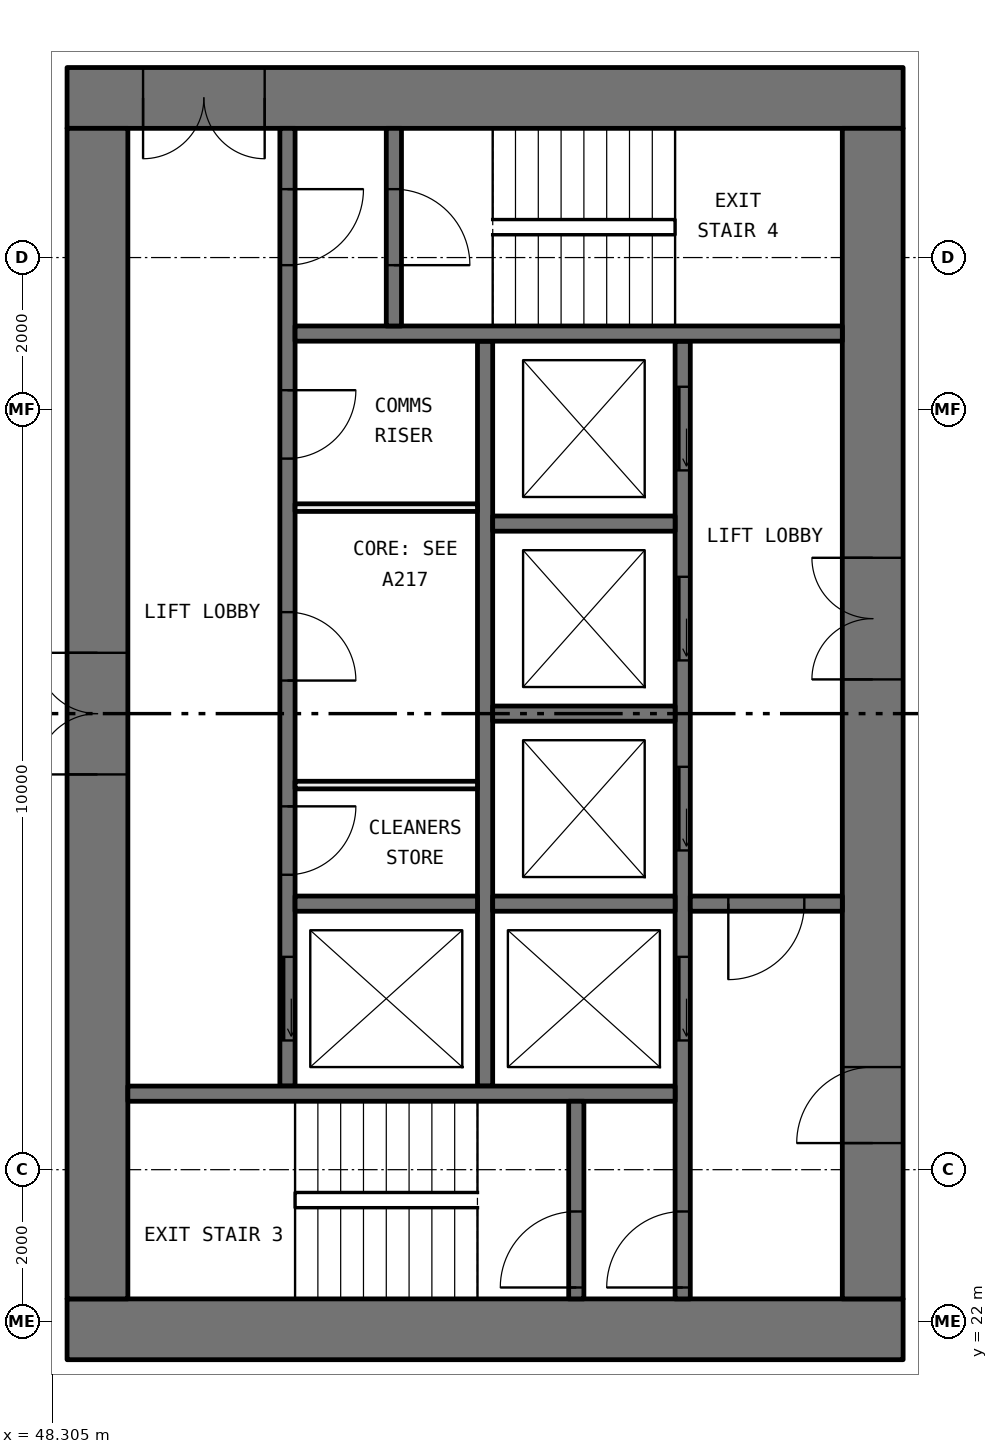
"""IFC4 building model, lengths in metres.
Left out: names, types, materials, properties, quantities, classifications, styles, units other than length and angle.
Written with IfcOpenShell. Run it as: python <this file> out.ifc"""

import sys

from ifc_helpers import new_model, si_unit, direction, frame, frame_2d, origin, place, context, subcontext, project, spatial, rectangle, extrude, element, fill, save


model = new_model("IFC4")
c1 = context("Model", 3, precision=1e-05, world=origin(), true_north=direction((0.0, 1.0)))
c2 = subcontext(c1, "Body", "Model", "MODEL_VIEW")
j1 = project(units=[si_unit("LENGTHUNIT", "METRE"), si_unit("PLANEANGLEUNIT", "RADIAN")], contexts=[c1])
p1 = place(None, origin())
s1 = spatial("IfcSite", under=j1, at=p1, CompositionType="ELEMENT")
p2 = place(p1, origin())
s2 = spatial("IfcBuilding", under=s1, at=p2, CompositionType="ELEMENT")
p3 = place(p2, frame((0.0, 0.0, 67.95)))
s3 = spatial("IfcBuildingStorey", under=s2, at=p3, CompositionType="ELEMENT", Elevation=67.95)
p4 = place(p3, frame((59.5, 21.9, 0.0), z_axis=(0.0, 0.0, 1.0), x_axis=(-1.0, 0.0, 0.0)))
e1 = element("IfcWall", 1, at=p4, inside=s3, PredefinedType="SHEAR", context=c2, shape_type="SweptSolid", body=[
    extrude(rectangle(XDim=11.0, YDim=0.8, at=frame_2d((5.5, 0.0))), origin(), (0.0, 0.0, 1.0), 3.05),
])
p5 = place(p3, frame((59.5, 38.1, 0.0), z_axis=(0.0, 0.0, 1.0), x_axis=(-1.0, 0.0, 0.0)))
e2 = element("IfcWall", 2, at=p5, inside=s3, PredefinedType="SHEAR", context=c2, shape_type="SweptSolid", body=[
    extrude(rectangle(XDim=11.0, YDim=0.8, at=frame_2d((5.5, 0.0))), origin(), (0.0, 0.0, 1.0), 3.05),
])
p6 = place(p5, frame((8.4, 0.0, 0.0)))
e3 = element("IfcOpeningElement", 3, at=p6, cuts=e2, PredefinedType="OPENING", context=c2, shape_type="SweptSolid", body=[
    extrude(rectangle(XDim=1.6, YDim=2.1, at=frame_2d((0.8, 1.05))), frame((0.0, 0.41, 0.0), z_axis=(0.0, -1.0, 0.0), x_axis=(1.0, 0.0, 0.0)), (0.0, 0.0, 1.0), 0.82),
])
p7 = place(p3, frame((59.1, 22.3, 0.0), z_axis=(0.0, 0.0, 1.0), x_axis=(0.0, 1.0, 0.0)))
e4 = element("IfcWall", 4, at=p7, inside=s3, PredefinedType="SHEAR", context=c2, shape_type="SweptSolid", body=[
    extrude(rectangle(XDim=15.4, YDim=0.8, at=frame_2d((7.7, 0.0))), origin(), (0.0, 0.0, 1.0), 3.05),
])
p8 = place(p7, frame((8.15, 0.0, 0.0)))
e5 = element("IfcOpeningElement", 5, at=p8, cuts=e4, PredefinedType="OPENING", context=c2, shape_type="SweptSolid", body=[
    extrude(rectangle(XDim=1.6, YDim=2.1, at=frame_2d((0.8, 1.05))), frame((0.0, 0.41, 0.0), z_axis=(0.0, -1.0, 0.0), x_axis=(1.0, 0.0, 0.0)), (0.0, 0.0, 1.0), 0.82),
])
p9 = place(p7, frame((2.05, 0.0, 0.0)))
e6 = element("IfcOpeningElement", 6, at=p9, cuts=e4, PredefinedType="OPENING", context=c2, shape_type="SweptSolid", body=[
    extrude(rectangle(XDim=1.0, YDim=2.1, at=frame_2d((0.5, 1.05))), frame((0.0, 0.41, 0.0), z_axis=(0.0, -1.0, 0.0), x_axis=(1.0, 0.0, 0.0)), (0.0, 0.0, 1.0), 0.82),
])
p10 = place(p3, frame((48.9, 22.3, 0.0), z_axis=(0.0, 0.0, 1.0), x_axis=(0.0, 1.0, 0.0)))
e7 = element("IfcWall", 7, at=p10, inside=s3, PredefinedType="SHEAR", context=c2, shape_type="SweptSolid", body=[
    extrude(rectangle(XDim=15.4, YDim=0.8, at=frame_2d((7.7, 0.0))), origin(), (0.0, 0.0, 1.0), 3.05),
])
p11 = place(p10, frame((6.9, 0.0, 0.0)))
e8 = element("IfcOpeningElement", 8, at=p11, cuts=e7, PredefinedType="OPENING", context=c2, shape_type="SweptSolid", body=[
    extrude(rectangle(XDim=1.6, YDim=2.1, at=frame_2d((0.8, 1.05))), frame((0.0, 0.41, 0.0), z_axis=(0.0, -1.0, 0.0), x_axis=(1.0, 0.0, 0.0)), (0.0, 0.0, 1.0), 0.82),
])
p12 = place(p3, frame((56.6, 22.3, 0.0), z_axis=(0.0, 0.0, 1.0), x_axis=(0.0, 1.0, 0.0)))
e9 = element("IfcWall", 9, at=p12, inside=s3, PredefinedType="SOLIDWALL", context=c2, shape_type="SweptSolid", body=[
    extrude(rectangle(XDim=12.6, YDim=0.2, at=frame_2d((6.3, 0.0))), origin(), (0.0, 0.0, 1.0), 3.05),
])
p13 = place(p12, frame((3.4, 0.0, 0.0)))
e10 = element("IfcOpeningElement", 10, at=p13, cuts=e9, PredefinedType="OPENING", context=c2, shape_type="SweptSolid", body=[
    extrude(rectangle(XDim=1.1, YDim=2.1, at=frame_2d((0.55, 1.05))), frame((0.0, 0.11, 0.0), z_axis=(0.0, -1.0, 0.0), x_axis=(1.0, 0.0, 0.0)), (0.0, 0.0, 1.0), 0.22),
])
p14 = place(p12, frame((5.9, 0.0, 0.0)))
e11 = element("IfcOpeningElement", 11, at=p14, cuts=e9, PredefinedType="OPENING", context=c2, shape_type="SweptSolid", body=[
    extrude(rectangle(XDim=1.1, YDim=2.1, at=frame_2d((0.55, 1.05))), frame((0.0, 0.11, 0.0), z_axis=(0.0, -1.0, 0.0), x_axis=(1.0, 0.0, 0.0)), (0.0, 0.0, 1.0), 0.22),
])
p15 = place(p12, frame((8.4, 0.0, 0.0)))
e12 = element("IfcOpeningElement", 12, at=p15, cuts=e9, PredefinedType="OPENING", context=c2, shape_type="SweptSolid", body=[
    extrude(rectangle(XDim=1.1, YDim=2.1, at=frame_2d((0.55, 1.05))), frame((0.0, 0.11, 0.0), z_axis=(0.0, -1.0, 0.0), x_axis=(1.0, 0.0, 0.0)), (0.0, 0.0, 1.0), 0.22),
])
p16 = place(p12, frame((10.9, 0.0, 0.0)))
e13 = element("IfcOpeningElement", 13, at=p16, cuts=e9, PredefinedType="OPENING", context=c2, shape_type="SweptSolid", body=[
    extrude(rectangle(XDim=1.1, YDim=2.1, at=frame_2d((0.55, 1.05))), frame((0.0, 0.11, 0.0), z_axis=(0.0, -1.0, 0.0), x_axis=(1.0, 0.0, 0.0)), (0.0, 0.0, 1.0), 0.22),
])
p17 = place(p12, frame((0.15, 0.0, 0.0)))
e14 = element("IfcOpeningElement", 14, at=p17, cuts=e9, PredefinedType="OPENING", context=c2, shape_type="SweptSolid", body=[
    extrude(rectangle(XDim=1.0, YDim=2.1, at=frame_2d((0.5, 1.05))), frame((0.0, 0.11, 0.0), z_axis=(0.0, -1.0, 0.0), x_axis=(1.0, 0.0, 0.0)), (0.0, 0.0, 1.0), 0.22),
])
p18 = place(p3, frame((51.4, 25.1, 0.0), z_axis=(0.0, 0.0, 1.0), x_axis=(0.0, 1.0, 0.0)))
e15 = element("IfcWall", 15, at=p18, inside=s3, PredefinedType="SOLIDWALL", context=c2, shape_type="SweptSolid", body=[
    extrude(rectangle(XDim=12.6, YDim=0.2, at=frame_2d((6.3, 0.0))), origin(), (0.0, 0.0, 1.0), 3.05),
])
p19 = place(p18, frame((0.6, 0.0, 0.0)))
e16 = element("IfcOpeningElement", 16, at=p19, cuts=e15, PredefinedType="OPENING", context=c2, shape_type="SweptSolid", body=[
    extrude(rectangle(XDim=1.1, YDim=2.1, at=frame_2d((0.55, 1.05))), frame((0.0, 0.11, 0.0), z_axis=(0.0, -1.0, 0.0), x_axis=(1.0, 0.0, 0.0)), (0.0, 0.0, 1.0), 0.22),
])
p20 = place(p18, frame((10.8, 0.0, 0.0)))
e17 = element("IfcOpeningElement", 17, at=p20, cuts=e15, PredefinedType="OPENING", context=c2, shape_type="SweptSolid", body=[
    extrude(rectangle(XDim=1.0, YDim=2.1, at=frame_2d((0.5, 1.05))), frame((0.0, 0.11, 0.0), z_axis=(0.0, -1.0, 0.0), x_axis=(1.0, 0.0, 0.0)), (0.0, 0.0, 1.0), 0.22),
])
p21 = place(p18, frame((2.78, 0.0, 0.0)))
e18 = element("IfcOpeningElement", 18, at=p21, cuts=e15, PredefinedType="OPENING", context=c2, shape_type="SweptSolid", body=[
    extrude(rectangle(XDim=0.9, YDim=2.1, at=frame_2d((0.45, 1.05))), frame((0.0, 0.11, 0.0), z_axis=(0.0, -1.0, 0.0), x_axis=(1.0, 0.0, 0.0)), (0.0, 0.0, 1.0), 0.22),
])
p22 = place(p18, frame((5.335, 0.0, 0.0)))
e19 = element("IfcOpeningElement", 19, at=p22, cuts=e15, PredefinedType="OPENING", context=c2, shape_type="SweptSolid", body=[
    extrude(rectangle(XDim=0.9, YDim=2.1, at=frame_2d((0.45, 1.05))), frame((0.0, 0.11, 0.0), z_axis=(0.0, -1.0, 0.0), x_axis=(1.0, 0.0, 0.0)), (0.0, 0.0, 1.0), 0.22),
])
p23 = place(p18, frame((8.255, 0.0, 0.0)))
e20 = element("IfcOpeningElement", 20, at=p23, cuts=e15, PredefinedType="OPENING", context=c2, shape_type="SweptSolid", body=[
    extrude(rectangle(XDim=0.9, YDim=2.1, at=frame_2d((0.45, 1.05))), frame((0.0, 0.11, 0.0), z_axis=(0.0, -1.0, 0.0), x_axis=(1.0, 0.0, 0.0)), (0.0, 0.0, 1.0), 0.22),
])
p24 = place(p3, frame((54.0, 25.1, 0.0), z_axis=(0.0, 0.0, 1.0), x_axis=(0.0, 1.0, 0.0)))
e21 = element("IfcWall", 21, at=p24, inside=s3, PredefinedType="SOLIDWALL", context=c2, shape_type="SweptSolid", body=[
    extrude(rectangle(XDim=9.8, YDim=0.2, at=frame_2d((4.9, 0.0))), origin(), (0.0, 0.0, 1.0), 3.05),
])
for number, where, z_axis, x_axis in (
    (22, (56.5, 25.0, 0.0), (0.0, 0.0, 1.0), (-1.0, 0.0, 0.0)),
    (23, (58.7, 35.0, 0.0), (0.0, 0.0, 1.0), (-1.0, 0.0, 0.0)),
):
    element("IfcWall", number, at=place(p3, frame(where, z_axis=z_axis, x_axis=x_axis)), inside=s3, PredefinedType="SOLIDWALL", context=c2, shape_type="SweptSolid", body=[
        extrude(rectangle(XDim=7.2, YDim=0.2, at=frame_2d((3.6, 0.0))), origin(), (0.0, 0.0, 1.0), 3.05),
    ])
p25 = place(p3, frame((58.7, 27.5, 0.0), z_axis=(0.0, 0.0, 1.0), x_axis=(-1.0, 0.0, 0.0)))
e24 = element("IfcWall", 24, at=p25, inside=s3, PredefinedType="SOLIDWALL", context=c2, shape_type="SweptSolid", body=[
    extrude(rectangle(XDim=2.0, YDim=0.2, at=frame_2d((1.0, 0.0))), origin(), (0.0, 0.0, 1.0), 3.05),
])
p26 = place(p25, frame((0.5, 0.0, 0.0)))
e25 = element("IfcOpeningElement", 25, at=p26, cuts=e24, PredefinedType="OPENING", context=c2, shape_type="SweptSolid", body=[
    extrude(rectangle(XDim=1.0, YDim=2.1, at=frame_2d((0.5, 1.05))), frame((0.0, 0.11, 0.0), z_axis=(0.0, -1.0, 0.0), x_axis=(1.0, 0.0, 0.0)), (0.0, 0.0, 1.0), 0.22),
])
p27 = place(p3, frame((55.2, 22.3, 0.0), z_axis=(0.0, 0.0, 1.0), x_axis=(0.0, 1.0, 0.0)))
e26 = element("IfcWall", 26, at=p27, inside=s3, PredefinedType="SOLIDWALL", context=c2, shape_type="SweptSolid", body=[
    extrude(rectangle(XDim=2.6, YDim=0.2, at=frame_2d((1.3, 0.0))), origin(), (0.0, 0.0, 1.0), 3.05),
])
p28 = place(p27, frame((0.15, 0.0, 0.0)))
e27 = element("IfcOpeningElement", 27, at=p28, cuts=e26, PredefinedType="OPENING", context=c2, shape_type="SweptSolid", body=[
    extrude(rectangle(XDim=1.0, YDim=2.1, at=frame_2d((0.5, 1.05))), frame((0.0, 0.11, 0.0), z_axis=(0.0, -1.0, 0.0), x_axis=(1.0, 0.0, 0.0)), (0.0, 0.0, 1.0), 0.22),
])
p29 = place(p3, frame((52.8, 35.1, 0.0), z_axis=(0.0, 0.0, 1.0), x_axis=(0.0, 1.0, 0.0)))
e28 = element("IfcWall", 28, at=p29, inside=s3, PredefinedType="SOLIDWALL", context=c2, shape_type="SweptSolid", body=[
    extrude(rectangle(XDim=2.6, YDim=0.2, at=frame_2d((1.3, 0.0))), origin(), (0.0, 0.0, 1.0), 3.05),
])
p30 = place(p29, frame((0.8, 0.0, 0.0)))
e29 = element("IfcOpeningElement", 29, at=p30, cuts=e28, PredefinedType="OPENING", context=c2, shape_type="SweptSolid", body=[
    extrude(rectangle(XDim=1.0, YDim=2.1, at=frame_2d((0.5, 1.05))), frame((0.0, 0.11, 0.0), z_axis=(0.0, -1.0, 0.0), x_axis=(1.0, 0.0, 0.0)), (0.0, 0.0, 1.0), 0.22),
])
for number, where, z_axis, x_axis in (
    (30, (56.5, 27.5, 0.0), (0.0, 0.0, 1.0), (-1.0, 0.0, 0.0)),
    (31, (56.5, 30.0, 0.0), (0.0, 0.0, 1.0), (-1.0, 0.0, 0.0)),
    (32, (56.5, 32.5, 0.0), (0.0, 0.0, 1.0), (-1.0, 0.0, 0.0)),
    (33, (53.9, 27.5, 0.0), (0.0, 0.0, 1.0), (-1.0, 0.0, 0.0)),
):
    element("IfcWall", number, at=place(p3, frame(where, z_axis=z_axis, x_axis=x_axis)), inside=s3, PredefinedType="SOLIDWALL", context=c2, shape_type="SweptSolid", body=[
        extrude(rectangle(XDim=2.4, YDim=0.2, at=frame_2d((1.2, 0.0))), origin(), (0.0, 0.0, 1.0), 3.05),
    ])
for number, where, z_axis, x_axis in (
    (34, (53.9, 29.06, 0.0), (0.0, 0.0, 1.0), (-1.0, 0.0, 0.0)),
    (35, (53.9, 32.71, 0.0), (0.0, 0.0, 1.0), (-1.0, 0.0, 0.0)),
):
    element("IfcWall", number, at=place(p3, frame(where, z_axis=z_axis, x_axis=x_axis)), inside=s3, PredefinedType="PARTITIONING", context=c2, shape_type="SweptSolid", body=[
        extrude(rectangle(XDim=2.4, YDim=0.1, at=frame_2d((1.2, 0.0))), origin(), (0.0, 0.0, 1.0), 3.05),
    ])
p31 = place(p19, origin())
e36 = element("IfcDoor", 36, at=p31, inside=s3, OperationType="SLIDING_TO_LEFT", PredefinedType="DOOR", context=c2, shape_type="SweptSolid", body=[
    extrude(rectangle(XDim=1.1, YDim=2.1, at=frame_2d((0.55, 1.05))), frame((0.0, 0.025, 0.0), z_axis=(0.0, -1.0, 0.0), x_axis=(1.0, 0.0, 0.0)), (0.0, 0.0, 1.0), 0.05),
])
fill(e16, e36)
p32 = place(p13, origin())
e37 = element("IfcDoor", 37, at=p32, inside=s3, OperationType="SLIDING_TO_LEFT", PredefinedType="DOOR", context=c2, shape_type="SweptSolid", body=[
    extrude(rectangle(XDim=1.1, YDim=2.1, at=frame_2d((0.55, 1.05))), frame((0.0, 0.025, 0.0), z_axis=(0.0, -1.0, 0.0), x_axis=(1.0, 0.0, 0.0)), (0.0, 0.0, 1.0), 0.05),
])
fill(e10, e37)
p33 = place(p14, origin())
e38 = element("IfcDoor", 38, at=p33, inside=s3, OperationType="SLIDING_TO_LEFT", PredefinedType="DOOR", context=c2, shape_type="SweptSolid", body=[
    extrude(rectangle(XDim=1.1, YDim=2.1, at=frame_2d((0.55, 1.05))), frame((0.0, 0.025, 0.0), z_axis=(0.0, -1.0, 0.0), x_axis=(1.0, 0.0, 0.0)), (0.0, 0.0, 1.0), 0.05),
])
fill(e11, e38)
p34 = place(p15, origin())
e39 = element("IfcDoor", 39, at=p34, inside=s3, OperationType="SLIDING_TO_LEFT", PredefinedType="DOOR", context=c2, shape_type="SweptSolid", body=[
    extrude(rectangle(XDim=1.1, YDim=2.1, at=frame_2d((0.55, 1.05))), frame((0.0, 0.025, 0.0), z_axis=(0.0, -1.0, 0.0), x_axis=(1.0, 0.0, 0.0)), (0.0, 0.0, 1.0), 0.05),
])
fill(e12, e39)
p35 = place(p16, origin())
e40 = element("IfcDoor", 40, at=p35, inside=s3, OperationType="SLIDING_TO_LEFT", PredefinedType="DOOR", context=c2, shape_type="SweptSolid", body=[
    extrude(rectangle(XDim=1.1, YDim=2.1, at=frame_2d((0.55, 1.05))), frame((0.0, 0.025, 0.0), z_axis=(0.0, -1.0, 0.0), x_axis=(1.0, 0.0, 0.0)), (0.0, 0.0, 1.0), 0.05),
])
fill(e13, e40)
p36 = place(p28, origin())
e41 = element("IfcDoor", 41, at=p36, inside=s3, OperationType="SINGLE_SWING_RIGHT", PredefinedType="DOOR", context=c2, shape_type="SweptSolid", body=[
    extrude(rectangle(XDim=1.0, YDim=2.1, at=frame_2d((0.5, 1.05))), frame((0.0, 0.025, 0.0), z_axis=(0.0, -1.0, 0.0), x_axis=(1.0, 0.0, 0.0)), (0.0, 0.0, 1.0), 0.05),
])
fill(e27, e41)
p37 = place(p17, origin())
e42 = element("IfcDoor", 42, at=p37, inside=s3, OperationType="SINGLE_SWING_RIGHT", PredefinedType="DOOR", context=c2, shape_type="SweptSolid", body=[
    extrude(rectangle(XDim=1.0, YDim=2.1, at=frame_2d((0.5, 1.05))), frame((0.0, 0.025, 0.0), z_axis=(0.0, -1.0, 0.0), x_axis=(1.0, 0.0, 0.0)), (0.0, 0.0, 1.0), 0.05),
])
fill(e14, e42)
p38 = place(p20, frame((1.0, 0.0, 0.0), x_axis=(-1.0, 0.0, 0.0)))
e43 = element("IfcDoor", 43, at=p38, inside=s3, OperationType="SINGLE_SWING_RIGHT", PredefinedType="DOOR", context=c2, shape_type="SweptSolid", body=[
    extrude(rectangle(XDim=1.0, YDim=2.1, at=frame_2d((0.5, 1.05))), frame((0.0, 0.025, 0.0), z_axis=(0.0, -1.0, 0.0), x_axis=(1.0, 0.0, 0.0)), (0.0, 0.0, 1.0), 0.05),
])
fill(e17, e43)
p39 = place(p30, frame((1.0, 0.0, 0.0), x_axis=(-1.0, 0.0, 0.0)))
e44 = element("IfcDoor", 44, at=p39, inside=s3, OperationType="SINGLE_SWING_LEFT", PredefinedType="DOOR", context=c2, shape_type="SweptSolid", body=[
    extrude(rectangle(XDim=1.0, YDim=2.1, at=frame_2d((0.5, 1.05))), frame((0.0, 0.025, 0.0), z_axis=(0.0, -1.0, 0.0), x_axis=(1.0, 0.0, 0.0)), (0.0, 0.0, 1.0), 0.05),
])
fill(e29, e44)
p40 = place(p26, origin())
e45 = element("IfcDoor", 45, at=p40, inside=s3, OperationType="SINGLE_SWING_LEFT", PredefinedType="DOOR", context=c2, shape_type="SweptSolid", body=[
    extrude(rectangle(XDim=1.0, YDim=2.1, at=frame_2d((0.5, 1.05))), frame((0.0, 0.025, 0.0), z_axis=(0.0, -1.0, 0.0), x_axis=(1.0, 0.0, 0.0)), (0.0, 0.0, 1.0), 0.05),
])
fill(e25, e45)
p41 = place(p8, origin())
e46 = element("IfcDoor", 46, at=p41, inside=s3, OperationType="DOUBLE_DOOR_SINGLE_SWING", PredefinedType="DOOR", context=c2, shape_type="SweptSolid", body=[
    extrude(rectangle(XDim=1.6, YDim=2.1, at=frame_2d((0.8, 1.05))), frame((0.0, 0.025, 0.0), z_axis=(0.0, -1.0, 0.0), x_axis=(1.0, 0.0, 0.0)), (0.0, 0.0, 1.0), 0.05),
])
fill(e5, e46)
p42 = place(p9, origin())
e47 = element("IfcDoor", 47, at=p42, inside=s3, OperationType="SINGLE_SWING_RIGHT", PredefinedType="DOOR", context=c2, shape_type="SweptSolid", body=[
    extrude(rectangle(XDim=1.0, YDim=2.1, at=frame_2d((0.5, 1.05))), frame((0.0, 0.025, 0.0), z_axis=(0.0, -1.0, 0.0), x_axis=(1.0, 0.0, 0.0)), (0.0, 0.0, 1.0), 0.05),
])
fill(e6, e47)
p43 = place(p6, origin())
e48 = element("IfcDoor", 48, at=p43, inside=s3, OperationType="DOUBLE_DOOR_SINGLE_SWING", PredefinedType="DOOR", context=c2, shape_type="SweptSolid", body=[
    extrude(rectangle(XDim=1.6, YDim=2.1, at=frame_2d((0.8, 1.05))), frame((0.0, 0.025, 0.0), z_axis=(0.0, -1.0, 0.0), x_axis=(1.0, 0.0, 0.0)), (0.0, 0.0, 1.0), 0.05),
])
fill(e3, e48)
p44 = place(p11, origin())
e49 = element("IfcDoor", 49, at=p44, inside=s3, OperationType="DOUBLE_DOOR_SINGLE_SWING", PredefinedType="DOOR", context=c2, shape_type="SweptSolid", body=[
    extrude(rectangle(XDim=1.6, YDim=2.1, at=frame_2d((0.8, 1.05))), frame((0.0, 0.025, 0.0), z_axis=(0.0, -1.0, 0.0), x_axis=(1.0, 0.0, 0.0)), (0.0, 0.0, 1.0), 0.05),
])
fill(e8, e49)
p45 = place(p21, frame((0.9, 0.0, 0.0), x_axis=(-1.0, 0.0, 0.0)))
e50 = element("IfcDoor", 50, at=p45, inside=s3, OperationType="SINGLE_SWING_RIGHT", PredefinedType="DOOR", context=c2, shape_type="SweptSolid", body=[
    extrude(rectangle(XDim=0.9, YDim=2.1, at=frame_2d((0.45, 1.05))), frame((0.0, 0.025, 0.0), z_axis=(0.0, -1.0, 0.0), x_axis=(1.0, 0.0, 0.0)), (0.0, 0.0, 1.0), 0.05),
])
fill(e18, e50)
p46 = place(p22, frame((0.9, 0.0, 0.0), x_axis=(-1.0, 0.0, 0.0)))
e51 = element("IfcDoor", 51, at=p46, inside=s3, OperationType="SINGLE_SWING_LEFT", PredefinedType="DOOR", context=c2, shape_type="SweptSolid", body=[
    extrude(rectangle(XDim=0.9, YDim=2.1, at=frame_2d((0.45, 1.05))), frame((0.0, 0.025, 0.0), z_axis=(0.0, -1.0, 0.0), x_axis=(1.0, 0.0, 0.0)), (0.0, 0.0, 1.0), 0.05),
])
fill(e19, e51)
p47 = place(p23, frame((0.9, 0.0, 0.0), x_axis=(-1.0, 0.0, 0.0)))
e52 = element("IfcDoor", 52, at=p47, inside=s3, OperationType="SINGLE_SWING_RIGHT", PredefinedType="DOOR", context=c2, shape_type="SweptSolid", body=[
    extrude(rectangle(XDim=0.9, YDim=2.1, at=frame_2d((0.45, 1.05))), frame((0.0, 0.025, 0.0), z_axis=(0.0, -1.0, 0.0), x_axis=(1.0, 0.0, 0.0)), (0.0, 0.0, 1.0), 0.05),
])
fill(e20, e52)
save(model, sys.argv[1])
